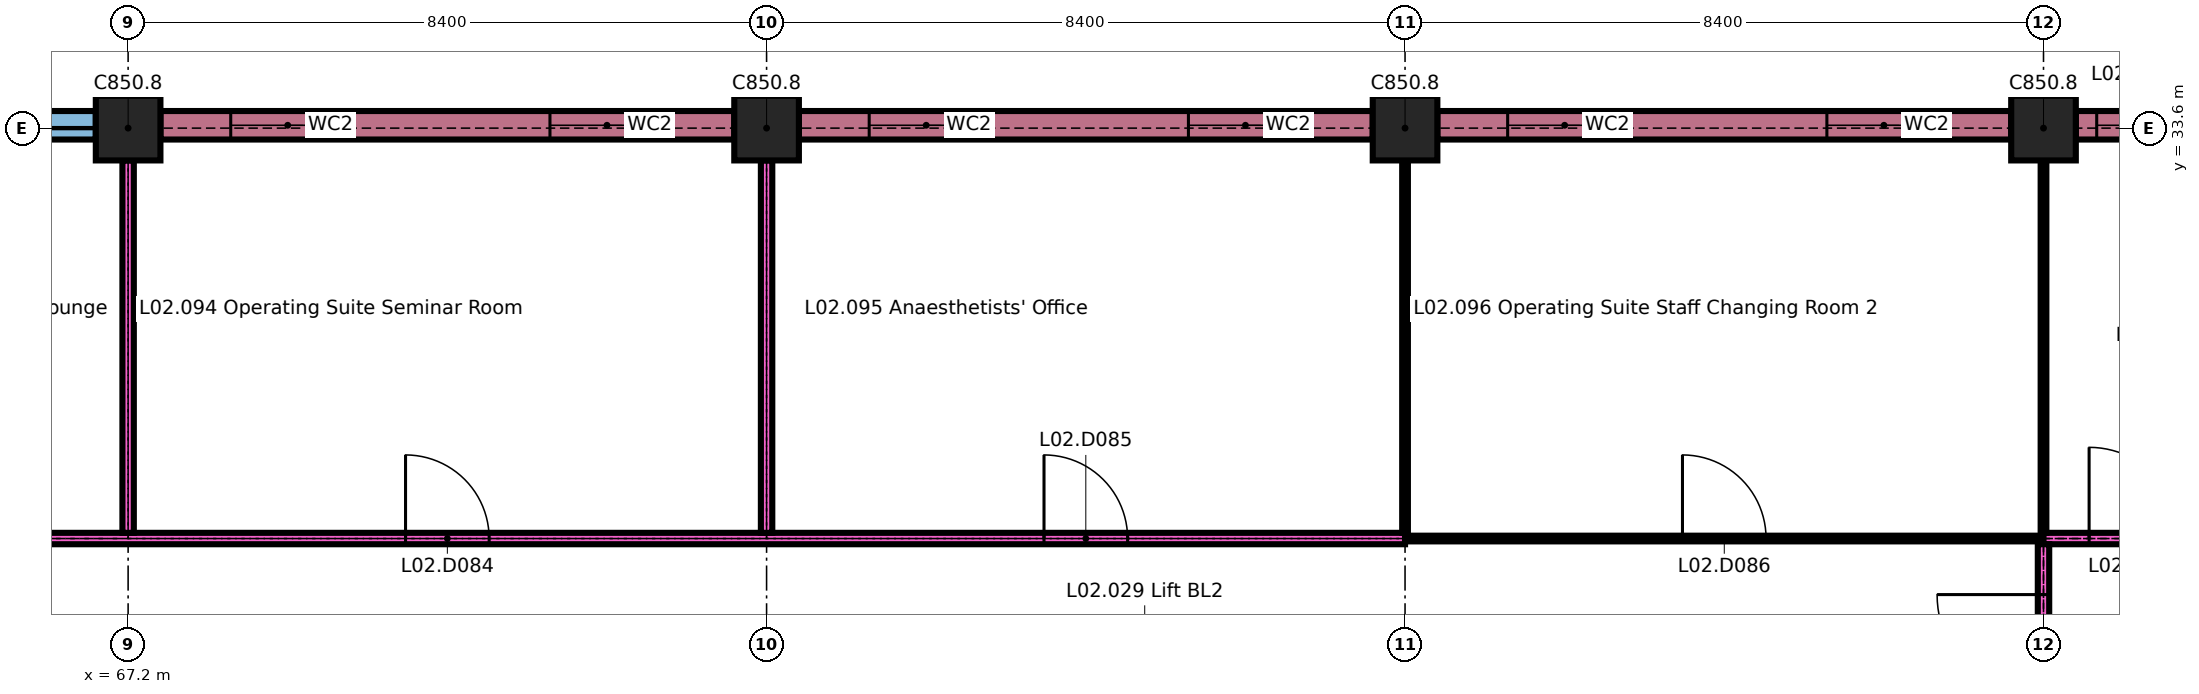
"""IFC4 building model, lengths in metres.
Left out: names, types, materials, properties, quantities, classifications, styles, units other than length and angle.
Written with IfcOpenShell. Run it as: python <this file> out.ifc"""

import sys

from ifc_helpers import new_model, si_unit, direction, frame, frame_2d, origin, origin_2d, place, context, subcontext, project, spatial, rectangle, extrude, element, fill, save


model = new_model("IFC4")
c1 = context("Model", 3, precision=1e-05, world=origin(), true_north=direction((0.0, 1.0)))
c2 = subcontext(c1, "Body", "Model", "MODEL_VIEW")
j1 = project(units=[si_unit("LENGTHUNIT", "METRE"), si_unit("PLANEANGLEUNIT", "RADIAN")], contexts=[c1])
p1 = place(None, origin())
s1 = spatial("IfcSite", under=j1, at=p1, CompositionType="ELEMENT")
p2 = place(p1, origin())
s2 = spatial("IfcBuilding", under=s1, at=p2, CompositionType="ELEMENT")
p3 = place(p2, frame((0.0, 0.0, 8.4)))
s3 = spatial("IfcBuildingStorey", under=s2, at=p3, CompositionType="ELEMENT", Elevation=8.4)
for number, where, z_axis, x_axis in (
    (1, (67.2, 33.6, 0.0), (0.0, 0.0, 1.0), (1.0, 0.0, 0.0)),
    (2, (75.6, 33.6, 0.0), (0.0, 0.0, 1.0), (1.0, 0.0, 0.0)),
    (3, (84.0, 33.6, 0.0), (0.0, 0.0, 1.0), (1.0, 0.0, 0.0)),
    (4, (92.4, 33.6, 0.0), (0.0, 0.0, 1.0), (1.0, 0.0, 0.0)),
):
    element("IfcColumn", number, at=place(p3, frame(where, z_axis=z_axis, x_axis=x_axis)), inside=s3, PredefinedType="COLUMN", context=c2, shape_type="SweptSolid", body=[
        extrude(rectangle(XDim=0.85, YDim=0.85, at=origin_2d()), origin(), (0.0, 0.0, 1.0), 4.2),
    ])
p4 = place(p3, frame((59.225, 33.637, 0.0), z_axis=(0.0, 0.0, 1.0), x_axis=(1.0, 0.0, 0.0)))
e5 = element("IfcWall", 5, at=p4, inside=s3, PredefinedType="SOLIDWALL", context=c2, shape_type="SweptSolid", body=[
    extrude(rectangle(XDim=7.55, YDim=0.375, at=frame_2d((3.775, 0.0))), origin(), (0.0, 0.0, 1.0), 0.6),
])
p5 = place(p3, frame((67.625, 33.637, 0.0), z_axis=(0.0, 0.0, 1.0), x_axis=(1.0, 0.0, 0.0)))
e6 = element("IfcWall", 6, at=p5, inside=s3, PredefinedType="SOLIDWALL", context=c2, shape_type="SweptSolid", body=[
    extrude(rectangle(XDim=7.55, YDim=0.375, at=frame_2d((3.775, 0.0))), origin(), (0.0, 0.0, 1.0), 3.9),
])
p6 = place(p5, frame((0.925, 0.0, 0.9)))
e7 = element("IfcOpeningElement", 7, at=p6, cuts=e6, PredefinedType="OPENING", context=c2, shape_type="SweptSolid", body=[
    extrude(rectangle(XDim=1.5, YDim=2.1, at=frame_2d((0.75, 1.05))), frame((0.0, 0.198, 0.0), z_axis=(0.0, -1.0, 0.0), x_axis=(1.0, 0.0, 0.0)), (0.0, 0.0, 1.0), 0.395),
])
p7 = place(p5, frame((5.125, 0.0, 0.9)))
e8 = element("IfcOpeningElement", 8, at=p7, cuts=e6, PredefinedType="OPENING", context=c2, shape_type="SweptSolid", body=[
    extrude(rectangle(XDim=1.5, YDim=2.1, at=frame_2d((0.75, 1.05))), frame((0.0, 0.198, 0.0), z_axis=(0.0, -1.0, 0.0), x_axis=(1.0, 0.0, 0.0)), (0.0, 0.0, 1.0), 0.395),
])
p8 = place(p3, frame((76.025, 33.637, 0.0), z_axis=(0.0, 0.0, 1.0), x_axis=(1.0, 0.0, 0.0)))
e9 = element("IfcWall", 9, at=p8, inside=s3, PredefinedType="SOLIDWALL", context=c2, shape_type="SweptSolid", body=[
    extrude(rectangle(XDim=7.55, YDim=0.375, at=frame_2d((3.775, 0.0))), origin(), (0.0, 0.0, 1.0), 3.9),
])
p9 = place(p8, frame((0.925, 0.0, 0.9)))
e10 = element("IfcOpeningElement", 10, at=p9, cuts=e9, PredefinedType="OPENING", context=c2, shape_type="SweptSolid", body=[
    extrude(rectangle(XDim=1.5, YDim=2.1, at=frame_2d((0.75, 1.05))), frame((0.0, 0.198, 0.0), z_axis=(0.0, -1.0, 0.0), x_axis=(1.0, 0.0, 0.0)), (0.0, 0.0, 1.0), 0.395),
])
p10 = place(p8, frame((5.125, 0.0, 0.9)))
e11 = element("IfcOpeningElement", 11, at=p10, cuts=e9, PredefinedType="OPENING", context=c2, shape_type="SweptSolid", body=[
    extrude(rectangle(XDim=1.5, YDim=2.1, at=frame_2d((0.75, 1.05))), frame((0.0, 0.198, 0.0), z_axis=(0.0, -1.0, 0.0), x_axis=(1.0, 0.0, 0.0)), (0.0, 0.0, 1.0), 0.395),
])
p11 = place(p3, frame((84.425, 33.637, 0.0), z_axis=(0.0, 0.0, 1.0), x_axis=(1.0, 0.0, 0.0)))
e12 = element("IfcWall", 12, at=p11, inside=s3, PredefinedType="SOLIDWALL", context=c2, shape_type="SweptSolid", body=[
    extrude(rectangle(XDim=7.55, YDim=0.375, at=frame_2d((3.775, 0.0))), origin(), (0.0, 0.0, 1.0), 3.9),
])
p12 = place(p11, frame((0.925, 0.0, 0.9)))
e13 = element("IfcOpeningElement", 13, at=p12, cuts=e12, PredefinedType="OPENING", context=c2, shape_type="SweptSolid", body=[
    extrude(rectangle(XDim=1.5, YDim=2.1, at=frame_2d((0.75, 1.05))), frame((0.0, 0.198, 0.0), z_axis=(0.0, -1.0, 0.0), x_axis=(1.0, 0.0, 0.0)), (0.0, 0.0, 1.0), 0.395),
])
p13 = place(p11, frame((5.125, 0.0, 0.9)))
e14 = element("IfcOpeningElement", 14, at=p13, cuts=e12, PredefinedType="OPENING", context=c2, shape_type="SweptSolid", body=[
    extrude(rectangle(XDim=1.5, YDim=2.1, at=frame_2d((0.75, 1.05))), frame((0.0, 0.198, 0.0), z_axis=(0.0, -1.0, 0.0), x_axis=(1.0, 0.0, 0.0)), (0.0, 0.0, 1.0), 0.395),
])
p14 = place(p3, frame((92.825, 33.637, 0.0), z_axis=(0.0, 0.0, 1.0), x_axis=(1.0, 0.0, 0.0)))
e15 = element("IfcWall", 15, at=p14, inside=s3, PredefinedType="SOLIDWALL", context=c2, shape_type="SweptSolid", body=[
    extrude(rectangle(XDim=1.975, YDim=0.375, at=frame_2d((0.988, 0.0))), origin(), (0.0, 0.0, 1.0), 3.9),
])
p15 = place(p14, frame((0.275, 0.0, 0.9)))
e16 = element("IfcOpeningElement", 16, at=p15, cuts=e15, PredefinedType="OPENING", context=c2, shape_type="SweptSolid", body=[
    extrude(rectangle(XDim=1.2, YDim=2.1, at=frame_2d((0.6, 1.05))), frame((0.0, 0.198, 0.0), z_axis=(0.0, -1.0, 0.0), x_axis=(1.0, 0.0, 0.0)), (0.0, 0.0, 1.0), 0.395),
])
p16 = place(p3, frame((42.1, 28.2, 0.0), z_axis=(0.0, 0.0, 1.0), x_axis=(1.0, 0.0, 0.0)))
e17 = element("IfcWall", 17, at=p16, inside=s3, PredefinedType="PARTITIONING", context=c2, shape_type="SweptSolid", body=[
    extrude(rectangle(XDim=41.9, YDim=0.15, at=frame_2d((20.95, 0.0))), origin(), (0.0, 0.0, 1.0), 4.2),
])
p17 = place(p16, frame((3.6, 0.0, 0.0)))
e18 = element("IfcOpeningElement", 18, at=p17, cuts=e17, PredefinedType="OPENING", context=c2, shape_type="SweptSolid", body=[
    extrude(rectangle(XDim=1.1, YDim=2.1, at=frame_2d((0.55, 1.05))), frame((0.0, 0.085, 0.0), z_axis=(0.0, -1.0, 0.0), x_axis=(1.0, 0.0, 0.0)), (0.0, 0.0, 1.0), 0.17),
])
p18 = place(p16, frame((11.95, 0.0, 0.0)))
e19 = element("IfcOpeningElement", 19, at=p18, cuts=e17, PredefinedType="OPENING", context=c2, shape_type="SweptSolid", body=[
    extrude(rectangle(XDim=1.1, YDim=2.1, at=frame_2d((0.55, 1.05))), frame((0.0, 0.085, 0.0), z_axis=(0.0, -1.0, 0.0), x_axis=(1.0, 0.0, 0.0)), (0.0, 0.0, 1.0), 0.17),
])
p19 = place(p16, frame((20.35, 0.0, 0.0)))
e20 = element("IfcOpeningElement", 20, at=p19, cuts=e17, PredefinedType="OPENING", context=c2, shape_type="SweptSolid", body=[
    extrude(rectangle(XDim=1.1, YDim=2.1, at=frame_2d((0.55, 1.05))), frame((0.0, 0.085, 0.0), z_axis=(0.0, -1.0, 0.0), x_axis=(1.0, 0.0, 0.0)), (0.0, 0.0, 1.0), 0.17),
])
p20 = place(p16, frame((28.75, 0.0, 0.0)))
e21 = element("IfcOpeningElement", 21, at=p20, cuts=e17, PredefinedType="OPENING", context=c2, shape_type="SweptSolid", body=[
    extrude(rectangle(XDim=1.1, YDim=2.1, at=frame_2d((0.55, 1.05))), frame((0.0, 0.085, 0.0), z_axis=(0.0, -1.0, 0.0), x_axis=(1.0, 0.0, 0.0)), (0.0, 0.0, 1.0), 0.17),
])
p21 = place(p16, frame((37.15, 0.0, 0.0)))
e22 = element("IfcOpeningElement", 22, at=p21, cuts=e17, PredefinedType="OPENING", context=c2, shape_type="SweptSolid", body=[
    extrude(rectangle(XDim=1.1, YDim=2.1, at=frame_2d((0.55, 1.05))), frame((0.0, 0.085, 0.0), z_axis=(0.0, -1.0, 0.0), x_axis=(1.0, 0.0, 0.0)), (0.0, 0.0, 1.0), 0.17),
])
p22 = place(p3, frame((84.0, 28.2, 0.0), z_axis=(0.0, 0.0, 1.0), x_axis=(1.0, 0.0, 0.0)))
e23 = element("IfcWall", 23, at=p22, inside=s3, PredefinedType="PARTITIONING", context=c2, shape_type="SweptSolid", body=[
    extrude(rectangle(XDim=8.4, YDim=0.075, at=frame_2d((4.2, 0.0))), origin(), (0.0, 0.0, 1.0), 4.2),
])
p23 = place(p22, frame((3.65, 0.0, 0.0)))
e24 = element("IfcOpeningElement", 24, at=p23, cuts=e23, PredefinedType="OPENING", context=c2, shape_type="SweptSolid", body=[
    extrude(rectangle(XDim=1.1, YDim=2.1, at=frame_2d((0.55, 1.05))), frame((0.0, 0.047, 0.0), z_axis=(0.0, -1.0, 0.0), x_axis=(1.0, 0.0, 0.0)), (0.0, 0.0, 1.0), 0.095),
])
p24 = place(p3, frame((92.4, 28.2, 0.0), z_axis=(0.0, 0.0, 1.0), x_axis=(1.0, 0.0, 0.0)))
e25 = element("IfcWall", 25, at=p24, inside=s3, PredefinedType="PARTITIONING", context=c2, shape_type="SweptSolid", body=[
    extrude(rectangle(XDim=16.7, YDim=0.15, at=frame_2d((8.35, 0.0))), origin(), (0.0, 0.0, 1.0), 4.2),
])
p25 = place(p24, frame((0.6, 0.0, 0.0)))
e26 = element("IfcOpeningElement", 26, at=p25, cuts=e25, PredefinedType="OPENING", context=c2, shape_type="SweptSolid", body=[
    extrude(rectangle(XDim=1.2, YDim=2.1, at=frame_2d((0.6, 1.05))), frame((0.0, 0.085, 0.0), z_axis=(0.0, -1.0, 0.0), x_axis=(1.0, 0.0, 0.0)), (0.0, 0.0, 1.0), 0.17),
])
p26 = place(p24, frame((9.0, 0.0, 0.0)))
e27 = element("IfcOpeningElement", 27, at=p26, cuts=e25, PredefinedType="OPENING", context=c2, shape_type="SweptSolid", body=[
    extrude(rectangle(XDim=1.2, YDim=2.1, at=frame_2d((0.6, 1.05))), frame((0.0, 0.085, 0.0), z_axis=(0.0, -1.0, 0.0), x_axis=(1.0, 0.0, 0.0)), (0.0, 0.0, 1.0), 0.17),
])
for number, where, z_axis, x_axis in (
    (28, (67.2, 28.275, 0.0), (0.0, 0.0, 1.0), (0.0, 1.0, 0.0)),
    (29, (75.6, 28.275, 0.0), (0.0, 0.0, 1.0), (0.0, 1.0, 0.0)),
):
    element("IfcWall", number, at=place(p3, frame(where, z_axis=z_axis, x_axis=x_axis)), inside=s3, PredefinedType="PARTITIONING", context=c2, shape_type="SweptSolid", body=[
        extrude(rectangle(XDim=4.9, YDim=0.15, at=frame_2d((2.45, 0.0))), origin(), (0.0, 0.0, 1.0), 4.2),
    ])
p27 = place(p3, frame((84.0, 28.275, 0.0), z_axis=(0.0, 0.0, 1.0), x_axis=(0.0, 1.0, 0.0)))
e30 = element("IfcWall", 30, at=p27, inside=s3, PredefinedType="PARTITIONING", context=c2, shape_type="SweptSolid", body=[
    extrude(rectangle(XDim=4.9, YDim=0.075, at=frame_2d((2.45, 0.0))), origin(), (0.0, 0.0, 1.0), 4.2),
])
p28 = place(p3, frame((92.4, 25.4, 0.0), z_axis=(0.0, 0.0, 1.0), x_axis=(0.0, 1.0, 0.0)))
e31 = element("IfcWall", 31, at=p28, inside=s3, PredefinedType="PARTITIONING", context=c2, shape_type="SweptSolid", body=[
    extrude(rectangle(XDim=2.725, YDim=0.15, at=frame_2d((1.363, 0.0))), origin(), (0.0, 0.0, 1.0), 4.2),
])
p29 = place(p28, frame((0.663, 0.0, 0.0)))
e32 = element("IfcOpeningElement", 32, at=p29, cuts=e31, PredefinedType="OPENING", context=c2, shape_type="SweptSolid", body=[
    extrude(rectangle(XDim=1.4, YDim=2.1, at=frame_2d((0.7, 1.05))), frame((0.0, 0.085, 0.0), z_axis=(0.0, -1.0, 0.0), x_axis=(1.0, 0.0, 0.0)), (0.0, 0.0, 1.0), 0.17),
])
p30 = place(p3, frame((92.4, 28.275, 0.0), z_axis=(0.0, 0.0, 1.0), x_axis=(0.0, 1.0, 0.0)))
e33 = element("IfcWall", 33, at=p30, inside=s3, PredefinedType="PARTITIONING", context=c2, shape_type="SweptSolid", body=[
    extrude(rectangle(XDim=4.9, YDim=0.075, at=frame_2d((2.45, 0.0))), origin(), (0.0, 0.0, 1.0), 4.2),
])
p31 = place(p6, origin())
e34 = element("IfcWindow", 34, at=p31, inside=s3, PartitioningType="SINGLE_PANEL", PredefinedType="WINDOW", context=c2, shape_type="SweptSolid", body=[
    extrude(rectangle(XDim=1.5, YDim=2.1, at=frame_2d((0.75, 1.05))), frame((0.0, 0.03, 0.0), z_axis=(0.0, -1.0, 0.0), x_axis=(1.0, 0.0, 0.0)), (0.0, 0.0, 1.0), 0.06),
])
fill(e7, e34)
p32 = place(p7, origin())
e35 = element("IfcWindow", 35, at=p32, inside=s3, PartitioningType="SINGLE_PANEL", PredefinedType="WINDOW", context=c2, shape_type="SweptSolid", body=[
    extrude(rectangle(XDim=1.5, YDim=2.1, at=frame_2d((0.75, 1.05))), frame((0.0, 0.03, 0.0), z_axis=(0.0, -1.0, 0.0), x_axis=(1.0, 0.0, 0.0)), (0.0, 0.0, 1.0), 0.06),
])
fill(e8, e35)
p33 = place(p9, origin())
e36 = element("IfcWindow", 36, at=p33, inside=s3, PartitioningType="SINGLE_PANEL", PredefinedType="WINDOW", context=c2, shape_type="SweptSolid", body=[
    extrude(rectangle(XDim=1.5, YDim=2.1, at=frame_2d((0.75, 1.05))), frame((0.0, 0.03, 0.0), z_axis=(0.0, -1.0, 0.0), x_axis=(1.0, 0.0, 0.0)), (0.0, 0.0, 1.0), 0.06),
])
fill(e10, e36)
p34 = place(p10, origin())
e37 = element("IfcWindow", 37, at=p34, inside=s3, PartitioningType="SINGLE_PANEL", PredefinedType="WINDOW", context=c2, shape_type="SweptSolid", body=[
    extrude(rectangle(XDim=1.5, YDim=2.1, at=frame_2d((0.75, 1.05))), frame((0.0, 0.03, 0.0), z_axis=(0.0, -1.0, 0.0), x_axis=(1.0, 0.0, 0.0)), (0.0, 0.0, 1.0), 0.06),
])
fill(e11, e37)
p35 = place(p12, origin())
e38 = element("IfcWindow", 38, at=p35, inside=s3, PartitioningType="SINGLE_PANEL", PredefinedType="WINDOW", context=c2, shape_type="SweptSolid", body=[
    extrude(rectangle(XDim=1.5, YDim=2.1, at=frame_2d((0.75, 1.05))), frame((0.0, 0.03, 0.0), z_axis=(0.0, -1.0, 0.0), x_axis=(1.0, 0.0, 0.0)), (0.0, 0.0, 1.0), 0.06),
])
fill(e13, e38)
p36 = place(p13, origin())
e39 = element("IfcWindow", 39, at=p36, inside=s3, PartitioningType="SINGLE_PANEL", PredefinedType="WINDOW", context=c2, shape_type="SweptSolid", body=[
    extrude(rectangle(XDim=1.5, YDim=2.1, at=frame_2d((0.75, 1.05))), frame((0.0, 0.03, 0.0), z_axis=(0.0, -1.0, 0.0), x_axis=(1.0, 0.0, 0.0)), (0.0, 0.0, 1.0), 0.06),
])
fill(e14, e39)
p37 = place(p15, origin())
e40 = element("IfcWindow", 40, at=p37, inside=s3, PartitioningType="SINGLE_PANEL", PredefinedType="WINDOW", context=c2, shape_type="SweptSolid", body=[
    extrude(rectangle(XDim=1.2, YDim=2.1, at=frame_2d((0.6, 1.05))), frame((0.0, 0.03, 0.0), z_axis=(0.0, -1.0, 0.0), x_axis=(1.0, 0.0, 0.0)), (0.0, 0.0, 1.0), 0.06),
])
fill(e16, e40)
p38 = place(p20, origin())
e41 = element("IfcDoor", 41, at=p38, inside=s3, OperationType="SINGLE_SWING_RIGHT", PredefinedType="DOOR", context=c2, shape_type="SweptSolid", body=[
    extrude(rectangle(XDim=1.1, YDim=2.1, at=frame_2d((0.55, 1.05))), frame((0.0, 0.025, 0.0), z_axis=(0.0, -1.0, 0.0), x_axis=(1.0, 0.0, 0.0)), (0.0, 0.0, 1.0), 0.05),
])
fill(e21, e41)
p39 = place(p21, origin())
e42 = element("IfcDoor", 42, at=p39, inside=s3, OperationType="SINGLE_SWING_RIGHT", PredefinedType="DOOR", context=c2, shape_type="SweptSolid", body=[
    extrude(rectangle(XDim=1.1, YDim=2.1, at=frame_2d((0.55, 1.05))), frame((0.0, 0.025, 0.0), z_axis=(0.0, -1.0, 0.0), x_axis=(1.0, 0.0, 0.0)), (0.0, 0.0, 1.0), 0.05),
])
fill(e22, e42)
p40 = place(p23, origin())
e43 = element("IfcDoor", 43, at=p40, inside=s3, OperationType="SINGLE_SWING_RIGHT", PredefinedType="DOOR", context=c2, shape_type="SweptSolid", body=[
    extrude(rectangle(XDim=1.1, YDim=2.1, at=frame_2d((0.55, 1.05))), frame((0.0, 0.025, 0.0), z_axis=(0.0, -1.0, 0.0), x_axis=(1.0, 0.0, 0.0)), (0.0, 0.0, 1.0), 0.05),
])
fill(e24, e43)
p41 = place(p25, origin())
e44 = element("IfcDoor", 44, at=p41, inside=s3, OperationType="SINGLE_SWING_RIGHT", PredefinedType="DOOR", context=c2, shape_type="SweptSolid", body=[
    extrude(rectangle(XDim=1.2, YDim=2.1, at=frame_2d((0.6, 1.05))), frame((0.0, 0.05, 0.0), z_axis=(0.0, -1.0, 0.0), x_axis=(1.0, 0.0, 0.0)), (0.0, 0.0, 1.0), 0.1),
])
fill(e26, e44)
p42 = place(p29, origin())
e45 = element("IfcDoor", 45, at=p42, inside=s3, OperationType="SINGLE_SWING_LEFT", PredefinedType="DOOR", context=c2, shape_type="SweptSolid", body=[
    extrude(rectangle(XDim=1.4, YDim=2.1, at=frame_2d((0.7, 1.05))), frame((0.0, 0.025, 0.0), z_axis=(0.0, -1.0, 0.0), x_axis=(1.0, 0.0, 0.0)), (0.0, 0.0, 1.0), 0.05),
])
fill(e32, e45)
save(model, sys.argv[1])
